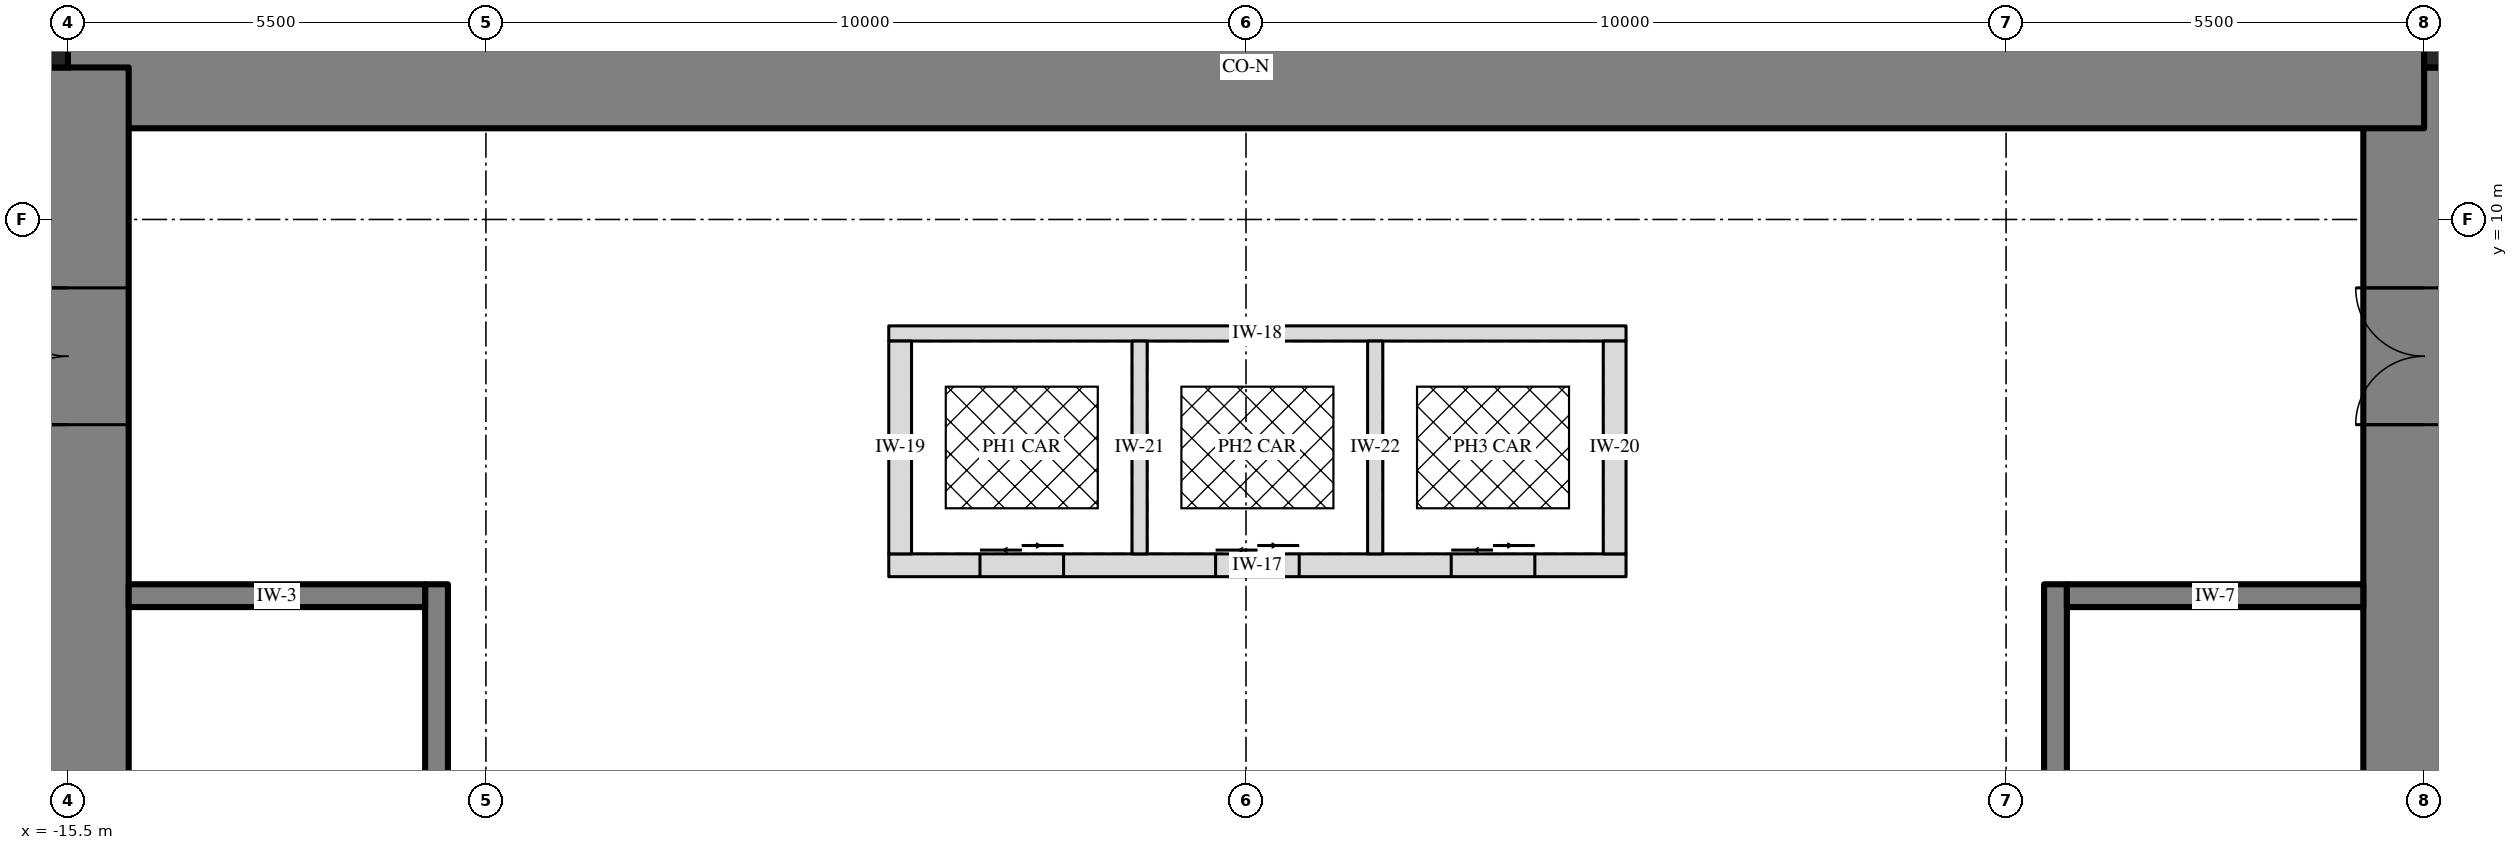
"""IFC4 building model, lengths in metres.
Left out: names, types, materials, properties, quantities, classifications, styles, units other than length and angle.
Written with IfcOpenShell. Run it as: python <this file> out.ifc"""

import sys

from ifc_helpers import new_model, si_unit, direction, frame, frame_2d, origin, origin_2d, place, context, subcontext, project, spatial, rectangle, extrude, element, fill, save


model = new_model("IFC4")
c1 = context("Model", 3, precision=1e-05, world=origin(), true_north=direction((0.0, 1.0)))
c2 = subcontext(c1, "Body", "Model", "MODEL_VIEW")
j1 = project(units=[si_unit("LENGTHUNIT", "METRE"), si_unit("PLANEANGLEUNIT", "RADIAN")], contexts=[c1])
p1 = place(None, origin())
s1 = spatial("IfcSite", under=j1, at=p1, CompositionType="ELEMENT")
p2 = place(p1, origin())
s2 = spatial("IfcBuilding", under=s1, at=p2, CompositionType="ELEMENT")
p3 = place(p2, frame((0.0, 0.0, 199.5)))
s3 = spatial("IfcBuildingStorey", under=s2, at=p3, CompositionType="ELEMENT", Elevation=199.5)
p4 = place(p3, frame((15.5, -12.0, -0.25), z_axis=(0.0, 0.0, 1.0), x_axis=(0.0, 1.0, 0.0)))
e1 = element("IfcWall", 1, at=p4, inside=s3, PredefinedType="SHEAR", context=c2, shape_type="SweptSolid", body=[
    extrude(rectangle(XDim=24.0, YDim=1.6, at=frame_2d((12.0, 0.0))), origin(), (0.0, 0.0, 1.0), 3.75),
])
p5 = place(p4, frame((3.2, 0.0, 0.25)))
e2 = element("IfcOpeningElement", 2, at=p5, cuts=e1, PredefinedType="OPENING", context=c2, shape_type="SweptSolid", body=[
    extrude(rectangle(XDim=1.2, YDim=2.1, at=frame_2d((0.6, 1.05))), frame((0.0, 0.81, 0.0), z_axis=(0.0, -1.0, 0.0), x_axis=(1.0, 0.0, 0.0)), (0.0, 0.0, 1.0), 1.62),
])
p6 = place(p4, frame((19.3, 0.0, 0.25)))
e3 = element("IfcOpeningElement", 3, at=p6, cuts=e1, PredefinedType="OPENING", context=c2, shape_type="SweptSolid", body=[
    extrude(rectangle(XDim=1.8, YDim=2.1, at=frame_2d((0.9, 1.05))), frame((0.0, 0.81, 0.0), z_axis=(0.0, -1.0, 0.0), x_axis=(1.0, 0.0, 0.0)), (0.0, 0.0, 1.0), 1.62),
])
p7 = place(p3, frame((-15.5, 12.0, -0.25), z_axis=(0.0, 0.0, 1.0), x_axis=(1.0, 0.0, 0.0)))
e4 = element("IfcWall", 4, at=p7, inside=s3, PredefinedType="SHEAR", context=c2, shape_type="SweptSolid", body=[
    extrude(rectangle(XDim=31.0, YDim=1.6, at=frame_2d((15.5, 0.0))), origin(), (0.0, 0.0, 1.0), 3.75),
])
p8 = place(p3, frame((-15.5, -12.0, -0.25), z_axis=(0.0, 0.0, 1.0), x_axis=(0.0, 1.0, 0.0)))
e5 = element("IfcWall", 5, at=p8, inside=s3, PredefinedType="SHEAR", context=c2, shape_type="SweptSolid", body=[
    extrude(rectangle(XDim=24.0, YDim=1.6, at=frame_2d((12.0, 0.0))), origin(), (0.0, 0.0, 1.0), 3.75),
])
p9 = place(p8, frame((3.2, 0.0, 0.25)))
e6 = element("IfcOpeningElement", 6, at=p9, cuts=e5, PredefinedType="OPENING", context=c2, shape_type="SweptSolid", body=[
    extrude(rectangle(XDim=1.2, YDim=2.1, at=frame_2d((0.6, 1.05))), frame((0.0, 0.81, 0.0), z_axis=(0.0, -1.0, 0.0), x_axis=(1.0, 0.0, 0.0)), (0.0, 0.0, 1.0), 1.62),
])
p10 = place(p8, frame((19.3, 0.0, 0.25)))
e7 = element("IfcOpeningElement", 7, at=p10, cuts=e5, PredefinedType="OPENING", context=c2, shape_type="SweptSolid", body=[
    extrude(rectangle(XDim=1.8, YDim=2.1, at=frame_2d((0.9, 1.05))), frame((0.0, 0.81, 0.0), z_axis=(0.0, -1.0, 0.0), x_axis=(1.0, 0.0, 0.0)), (0.0, 0.0, 1.0), 1.62),
])
for number, where, z_axis, x_axis in (
    (8, (15.9, 12.4, -0.25), (0.0, 0.0, 1.0), (1.0, 0.0, 0.0)),
    (9, (-15.9, 12.4, -0.25), (0.0, 0.0, 1.0), (1.0, 0.0, 0.0)),
):
    element("IfcColumn", number, at=place(p3, frame(where, z_axis=z_axis, x_axis=x_axis)), inside=s3, PredefinedType="COLUMN", context=c2, shape_type="SweptSolid", body=[
        extrude(rectangle(XDim=0.8, YDim=0.8, at=origin_2d()), origin(), (0.0, 0.0, 1.0), 3.75),
    ])
p11 = place(p3, frame((-10.65, -4.9, 0.0), z_axis=(0.0, 0.0, 1.0), x_axis=(0.0, 1.0, 0.0)))
e10 = element("IfcWall", 10, at=p11, inside=s3, PredefinedType="SOLIDWALL", context=c2, shape_type="SweptSolid", body=[
    extrude(rectangle(XDim=10.1, YDim=0.3, at=frame_2d((5.05, 0.0))), origin(), (0.0, 0.0, 1.0), 3.5),
])
p12 = place(p3, frame((-14.7, 5.05, 0.0), z_axis=(0.0, 0.0, 1.0), x_axis=(1.0, 0.0, 0.0)))
e11 = element("IfcWall", 11, at=p12, inside=s3, PredefinedType="SOLIDWALL", context=c2, shape_type="SweptSolid", body=[
    extrude(rectangle(XDim=3.9, YDim=0.3, at=frame_2d((1.95, 0.0))), origin(), (0.0, 0.0, 1.0), 3.5),
])
p13 = place(p3, frame((10.65, -4.9, 0.0), z_axis=(0.0, 0.0, 1.0), x_axis=(0.0, 1.0, 0.0)))
e12 = element("IfcWall", 12, at=p13, inside=s3, PredefinedType="SOLIDWALL", context=c2, shape_type="SweptSolid", body=[
    extrude(rectangle(XDim=10.1, YDim=0.3, at=frame_2d((5.05, 0.0))), origin(), (0.0, 0.0, 1.0), 3.5),
])
p14 = place(p3, frame((14.7, 5.05, 0.0), z_axis=(0.0, 0.0, 1.0), x_axis=(-1.0, 0.0, 0.0)))
e13 = element("IfcWall", 13, at=p14, inside=s3, PredefinedType="SOLIDWALL", context=c2, shape_type="SweptSolid", body=[
    extrude(rectangle(XDim=3.9, YDim=0.3, at=frame_2d((1.95, 0.0))), origin(), (0.0, 0.0, 1.0), 3.5),
])
p15 = place(p3, frame((-4.7, 5.45, 0.0), z_axis=(0.0, 0.0, 1.0), x_axis=(1.0, 0.0, 0.0)))
e14 = element("IfcWall", 14, at=p15, inside=s3, PredefinedType="PARTITIONING", context=c2, shape_type="SweptSolid", body=[
    extrude(rectangle(XDim=9.7, YDim=0.3, at=frame_2d((4.85, 0.0))), origin(), (0.0, 0.0, 1.0), 3.5),
])
p16 = place(p15, frame((1.2, 0.0, 0.0)))
e15 = element("IfcOpeningElement", 15, at=p16, cuts=e14, PredefinedType="OPENING", context=c2, shape_type="SweptSolid", body=[
    extrude(rectangle(XDim=1.1, YDim=2.1, at=frame_2d((0.55, 1.05))), frame((0.0, 0.16, 0.0), z_axis=(0.0, -1.0, 0.0), x_axis=(1.0, 0.0, 0.0)), (0.0, 0.0, 1.0), 0.32),
])
p17 = place(p15, frame((4.3, 0.0, 0.0)))
e16 = element("IfcOpeningElement", 16, at=p17, cuts=e14, PredefinedType="OPENING", context=c2, shape_type="SweptSolid", body=[
    extrude(rectangle(XDim=1.1, YDim=2.1, at=frame_2d((0.55, 1.05))), frame((0.0, 0.16, 0.0), z_axis=(0.0, -1.0, 0.0), x_axis=(1.0, 0.0, 0.0)), (0.0, 0.0, 1.0), 0.32),
])
p18 = place(p15, frame((7.4, 0.0, 0.0)))
e17 = element("IfcOpeningElement", 17, at=p18, cuts=e14, PredefinedType="OPENING", context=c2, shape_type="SweptSolid", body=[
    extrude(rectangle(XDim=1.1, YDim=2.1, at=frame_2d((0.55, 1.05))), frame((0.0, 0.16, 0.0), z_axis=(0.0, -1.0, 0.0), x_axis=(1.0, 0.0, 0.0)), (0.0, 0.0, 1.0), 0.32),
])
p19 = place(p3, frame((-4.7, 8.5, 0.0), z_axis=(0.0, 0.0, 1.0), x_axis=(1.0, 0.0, 0.0)))
e18 = element("IfcWall", 18, at=p19, inside=s3, PredefinedType="PARTITIONING", context=c2, shape_type="SweptSolid", body=[
    extrude(rectangle(XDim=9.7, YDim=0.2, at=frame_2d((4.85, 0.0))), origin(), (0.0, 0.0, 1.0), 3.5),
])
for number, where, z_axis, x_axis in (
    (19, (-4.55, 5.6, 0.0), (0.0, 0.0, 1.0), (0.0, 1.0, 0.0)),
    (20, (4.85, 5.6, 0.0), (0.0, 0.0, 1.0), (0.0, 1.0, 0.0)),
):
    element("IfcWall", number, at=place(p3, frame(where, z_axis=z_axis, x_axis=x_axis)), inside=s3, PredefinedType="PARTITIONING", context=c2, shape_type="SweptSolid", body=[
        extrude(rectangle(XDim=2.8, YDim=0.3, at=frame_2d((1.4, 0.0))), origin(), (0.0, 0.0, 1.0), 3.5),
    ])
for number, where, z_axis, x_axis in (
    (21, (-1.4, 5.6, 0.0), (0.0, 0.0, 1.0), (0.0, 1.0, 0.0)),
    (22, (1.7, 5.6, 0.0), (0.0, 0.0, 1.0), (0.0, 1.0, 0.0)),
):
    element("IfcWall", number, at=place(p3, frame(where, z_axis=z_axis, x_axis=x_axis)), inside=s3, PredefinedType="PARTITIONING", context=c2, shape_type="SweptSolid", body=[
        extrude(rectangle(XDim=2.8, YDim=0.2, at=frame_2d((1.4, 0.0))), origin(), (0.0, 0.0, 1.0), 3.5),
    ])
p20 = place(p3, frame((-10.65, 3.6, 0.0), z_axis=(0.0, 0.0, 1.0), x_axis=(1.0, 0.0, 0.0)))
e23 = element("IfcWall", 23, at=p20, inside=s3, PredefinedType="PARTITIONING", context=c2, shape_type="SweptSolid", body=[
    extrude(rectangle(XDim=21.3, YDim=0.3, at=frame_2d((10.65, 0.0))), origin(), (0.0, 0.0, 1.0), 3.5),
])
p21 = place(p20, frame((10.05, 0.0, 0.0)))
e24 = element("IfcOpeningElement", 24, at=p21, cuts=e23, PredefinedType="OPENING", context=c2, shape_type="SweptSolid", body=[
    extrude(rectangle(XDim=1.2, YDim=2.1, at=frame_2d((0.6, 1.05))), frame((0.0, 0.16, 0.0), z_axis=(0.0, -1.0, 0.0), x_axis=(1.0, 0.0, 0.0)), (0.0, 0.0, 1.0), 0.32),
])
p22 = place(p20, frame((19.238, 0.0, 0.0)))
e25 = element("IfcOpeningElement", 25, at=p22, cuts=e23, PredefinedType="OPENING", context=c2, shape_type="SweptSolid", body=[
    extrude(rectangle(XDim=0.9, YDim=2.1, at=frame_2d((0.45, 1.05))), frame((0.0, 0.16, 0.0), z_axis=(0.0, -1.0, 0.0), x_axis=(1.0, 0.0, 0.0)), (0.0, 0.0, 1.0), 0.32),
])
p23 = place(p3, frame((-4.2, -6.65, 0.0), z_axis=(0.0, 0.0, 1.0), x_axis=(0.0, 1.0, 0.0)))
e26 = element("IfcWall", 26, at=p23, inside=s3, PredefinedType="PARTITIONING", context=c2, shape_type="SweptSolid", body=[
    extrude(rectangle(XDim=10.25, YDim=0.3, at=frame_2d((5.125, 0.0))), origin(), (0.0, 0.0, 1.0), 3.5),
])
p24 = place(p23, frame((0.787, 0.0, 0.0)))
e27 = element("IfcOpeningElement", 27, at=p24, cuts=e26, PredefinedType="OPENING", context=c2, shape_type="SweptSolid", body=[
    extrude(rectangle(XDim=0.9, YDim=2.1, at=frame_2d((0.45, 1.05))), frame((0.0, 0.16, 0.0), z_axis=(0.0, -1.0, 0.0), x_axis=(1.0, 0.0, 0.0)), (0.0, 0.0, 1.0), 0.32),
])
p25 = place(p23, frame((5.912, 0.0, 0.0)))
e28 = element("IfcOpeningElement", 28, at=p25, cuts=e26, PredefinedType="OPENING", context=c2, shape_type="SweptSolid", body=[
    extrude(rectangle(XDim=0.9, YDim=2.1, at=frame_2d((0.45, 1.05))), frame((0.0, 0.16, 0.0), z_axis=(0.0, -1.0, 0.0), x_axis=(1.0, 0.0, 0.0)), (0.0, 0.0, 1.0), 0.32),
])
p26 = place(p3, frame((4.2, -6.65, 0.0), z_axis=(0.0, 0.0, 1.0), x_axis=(0.0, 1.0, 0.0)))
e29 = element("IfcWall", 29, at=p26, inside=s3, PredefinedType="PARTITIONING", context=c2, shape_type="SweptSolid", body=[
    extrude(rectangle(XDim=10.25, YDim=0.3, at=frame_2d((5.125, 0.0))), origin(), (0.0, 0.0, 1.0), 3.5),
])
p27 = place(p26, frame((2.15, 0.0, 0.0)))
e30 = element("IfcOpeningElement", 30, at=p27, cuts=e29, PredefinedType="OPENING", context=c2, shape_type="SweptSolid", body=[
    extrude(rectangle(XDim=0.9, YDim=2.1, at=frame_2d((0.45, 1.05))), frame((0.0, 0.16, 0.0), z_axis=(0.0, -1.0, 0.0), x_axis=(1.0, 0.0, 0.0)), (0.0, 0.0, 1.0), 0.32),
])
p28 = place(p26, frame((7.275, 0.0, 0.0)))
e31 = element("IfcOpeningElement", 31, at=p28, cuts=e29, PredefinedType="OPENING", context=c2, shape_type="SweptSolid", body=[
    extrude(rectangle(XDim=0.9, YDim=2.1, at=frame_2d((0.45, 1.05))), frame((0.0, 0.16, 0.0), z_axis=(0.0, -1.0, 0.0), x_axis=(1.0, 0.0, 0.0)), (0.0, 0.0, 1.0), 0.32),
])
p29 = place(p3, frame((7.425, -1.45, 0.0), z_axis=(0.0, 0.0, 1.0), x_axis=(0.0, 1.0, 0.0)))
e32 = element("IfcWall", 32, at=p29, inside=s3, PredefinedType="PARTITIONING", context=c2, shape_type="SweptSolid", body=[
    extrude(rectangle(XDim=5.05, YDim=0.3, at=frame_2d((2.525, 0.0))), origin(), (0.0, 0.0, 1.0), 3.5),
])
p30 = place(p3, frame((-4.85, 5.3, 0.0), z_axis=(0.0, 0.0, 1.0), x_axis=(0.0, 1.0, 0.0)))
e33 = element("IfcWall", 33, at=p30, inside=s3, PredefinedType="PARTITIONING", context=c2, shape_type="SweptSolid", body=[
    extrude(rectangle(XDim=5.9, YDim=0.3, at=frame_2d((2.95, 0.0))), origin(), (0.0, 0.0, 1.0), 3.5),
])
p31 = place(p30, frame((4.15, 0.0, 0.0)))
e34 = element("IfcOpeningElement", 34, at=p31, cuts=e33, PredefinedType="OPENING", context=c2, shape_type="SweptSolid", body=[
    extrude(rectangle(XDim=0.9, YDim=2.1, at=frame_2d((0.45, 1.05))), frame((0.0, 0.16, 0.0), z_axis=(0.0, -1.0, 0.0), x_axis=(1.0, 0.0, 0.0)), (0.0, 0.0, 1.0), 0.32),
])
p32 = place(p3, frame((5.15, 5.3, 0.0), z_axis=(0.0, 0.0, 1.0), x_axis=(0.0, 1.0, 0.0)))
e35 = element("IfcWall", 35, at=p32, inside=s3, PredefinedType="PARTITIONING", context=c2, shape_type="SweptSolid", body=[
    extrude(rectangle(XDim=5.9, YDim=0.3, at=frame_2d((2.95, 0.0))), origin(), (0.0, 0.0, 1.0), 3.5),
])
p33 = place(p32, frame((4.15, 0.0, 0.0)))
e36 = element("IfcOpeningElement", 36, at=p33, cuts=e35, PredefinedType="OPENING", context=c2, shape_type="SweptSolid", body=[
    extrude(rectangle(XDim=0.9, YDim=2.1, at=frame_2d((0.45, 1.05))), frame((0.0, 0.16, 0.0), z_axis=(0.0, -1.0, 0.0), x_axis=(1.0, 0.0, 0.0)), (0.0, 0.0, 1.0), 0.32),
])
p34 = place(p3, frame((0.2, 8.5, 0.0), z_axis=(0.0, 0.0, 1.0), x_axis=(0.0, 1.0, 0.0)))
e37 = element("IfcWall", 37, at=p34, inside=s3, PredefinedType="PARTITIONING", context=c2, shape_type="SweptSolid", body=[
    extrude(rectangle(XDim=2.7, YDim=0.3, at=frame_2d((1.35, 0.0))), origin(), (0.0, 0.0, 1.0), 3.5),
])
p35 = place(p10, origin())
e38 = element("IfcDoor", 38, at=p35, inside=s3, OperationType="DOUBLE_DOOR_SINGLE_SWING", PredefinedType="DOOR", context=c2, shape_type="SweptSolid", body=[
    extrude(rectangle(XDim=1.8, YDim=2.1, at=frame_2d((0.9, 1.05))), frame((0.0, 0.025, 0.0), z_axis=(0.0, -1.0, 0.0), x_axis=(1.0, 0.0, 0.0)), (0.0, 0.0, 1.0), 0.05),
])
fill(e7, e38)
p36 = place(p6, origin())
e39 = element("IfcDoor", 39, at=p36, inside=s3, OperationType="DOUBLE_DOOR_SINGLE_SWING", PredefinedType="DOOR", context=c2, shape_type="SweptSolid", body=[
    extrude(rectangle(XDim=1.8, YDim=2.1, at=frame_2d((0.9, 1.05))), frame((0.0, 0.025, 0.0), z_axis=(0.0, -1.0, 0.0), x_axis=(1.0, 0.0, 0.0)), (0.0, 0.0, 1.0), 0.05),
])
fill(e3, e39)
p37 = place(p16, origin())
e40 = element("IfcDoor", 40, at=p37, inside=s3, OperationType="DOUBLE_DOOR_SLIDING", PredefinedType="DOOR", context=c2, shape_type="SweptSolid", body=[
    extrude(rectangle(XDim=1.1, YDim=2.1, at=frame_2d((0.55, 1.05))), frame((0.0, 0.025, 0.0), z_axis=(0.0, -1.0, 0.0), x_axis=(1.0, 0.0, 0.0)), (0.0, 0.0, 1.0), 0.05),
])
fill(e15, e40)
p38 = place(p17, origin())
e41 = element("IfcDoor", 41, at=p38, inside=s3, OperationType="DOUBLE_DOOR_SLIDING", PredefinedType="DOOR", context=c2, shape_type="SweptSolid", body=[
    extrude(rectangle(XDim=1.1, YDim=2.1, at=frame_2d((0.55, 1.05))), frame((0.0, 0.025, 0.0), z_axis=(0.0, -1.0, 0.0), x_axis=(1.0, 0.0, 0.0)), (0.0, 0.0, 1.0), 0.05),
])
fill(e16, e41)
p39 = place(p18, origin())
e42 = element("IfcDoor", 42, at=p39, inside=s3, OperationType="DOUBLE_DOOR_SLIDING", PredefinedType="DOOR", context=c2, shape_type="SweptSolid", body=[
    extrude(rectangle(XDim=1.1, YDim=2.1, at=frame_2d((0.55, 1.05))), frame((0.0, 0.025, 0.0), z_axis=(0.0, -1.0, 0.0), x_axis=(1.0, 0.0, 0.0)), (0.0, 0.0, 1.0), 0.05),
])
fill(e17, e42)
p40 = place(p21, origin())
e43 = element("IfcDoor", 43, at=p40, inside=s3, OperationType="SINGLE_SWING_LEFT", PredefinedType="DOOR", context=c2, shape_type="SweptSolid", body=[
    extrude(rectangle(XDim=1.2, YDim=2.1, at=frame_2d((0.6, 1.05))), frame((0.0, 0.025, 0.0), z_axis=(0.0, -1.0, 0.0), x_axis=(1.0, 0.0, 0.0)), (0.0, 0.0, 1.0), 0.05),
])
fill(e24, e43)
p41 = place(p22, origin())
e44 = element("IfcDoor", 44, at=p41, inside=s3, OperationType="SINGLE_SWING_RIGHT", PredefinedType="DOOR", context=c2, shape_type="SweptSolid", body=[
    extrude(rectangle(XDim=0.9, YDim=2.1, at=frame_2d((0.45, 1.05))), frame((0.0, 0.025, 0.0), z_axis=(0.0, -1.0, 0.0), x_axis=(1.0, 0.0, 0.0)), (0.0, 0.0, 1.0), 0.05),
])
fill(e25, e44)
p42 = place(p31, origin())
e45 = element("IfcDoor", 45, at=p42, inside=s3, OperationType="SINGLE_SWING_RIGHT", PredefinedType="DOOR", context=c2, shape_type="SweptSolid", body=[
    extrude(rectangle(XDim=0.9, YDim=2.1, at=frame_2d((0.45, 1.05))), frame((0.0, 0.025, 0.0), z_axis=(0.0, -1.0, 0.0), x_axis=(1.0, 0.0, 0.0)), (0.0, 0.0, 1.0), 0.05),
])
fill(e34, e45)
p43 = place(p33, origin())
e46 = element("IfcDoor", 46, at=p43, inside=s3, OperationType="SINGLE_SWING_LEFT", PredefinedType="DOOR", context=c2, shape_type="SweptSolid", body=[
    extrude(rectangle(XDim=0.9, YDim=2.1, at=frame_2d((0.45, 1.05))), frame((0.0, 0.025, 0.0), z_axis=(0.0, -1.0, 0.0), x_axis=(1.0, 0.0, 0.0)), (0.0, 0.0, 1.0), 0.05),
])
fill(e36, e46)
save(model, sys.argv[1])
